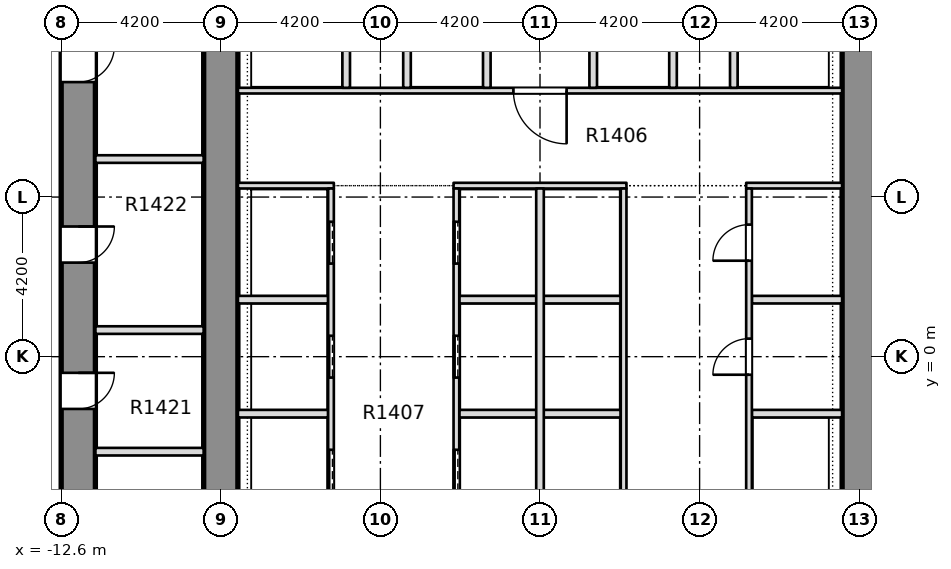
"""IFC4 building model, lengths in metres.
Left out: names, types, materials, properties, quantities, classifications, styles, units other than length and angle.
Written with IfcOpenShell. Run it as: python <this file> out.ifc"""

import sys

from ifc_helpers import new_model, si_unit, direction, frame, frame_2d, origin, place, context, subcontext, project, spatial, rectangle, extrude, element, fill, save


model = new_model("IFC4")
c1 = context("Model", 3, precision=1e-05, world=origin(), true_north=direction((0.0, 1.0)))
c2 = subcontext(c1, "Body", "Model", "MODEL_VIEW")
j1 = project(units=[si_unit("LENGTHUNIT", "METRE"), si_unit("PLANEANGLEUNIT", "RADIAN")], contexts=[c1])
p1 = place(None, origin())
s1 = spatial("IfcSite", under=j1, at=p1, CompositionType="ELEMENT")
p2 = place(p1, origin())
s2 = spatial("IfcBuilding", under=s1, at=p2, CompositionType="ELEMENT")
p3 = place(p2, frame((0.0, 0.0, 62.1)))
s3 = spatial("IfcBuildingStorey", under=s2, at=p3, CompositionType="ELEMENT", Elevation=62.1)
p4 = place(p3, frame((-12.15, -8.4, -0.32), z_axis=(0.0, 0.0, 1.0), x_axis=(0.0, 1.0, 0.0)))
e1 = element("IfcWall", 1, at=p4, inside=s3, PredefinedType="SHEAR", context=c2, shape_type="SweptSolid", body=[
    extrude(rectangle(XDim=30.15, YDim=0.9, at=frame_2d((15.075, 0.0))), origin(), (0.0, 0.0, 1.0), 3.45),
])
p5 = place(p4, frame((2.925, 0.0, 0.32)))
e2 = element("IfcOpeningElement", 2, at=p5, cuts=e1, PredefinedType="OPENING", context=c2, shape_type="SweptSolid", body=[
    extrude(rectangle(XDim=0.95, YDim=2.1, at=frame_2d((0.475, 1.05))), frame((0.0, 0.46, 0.0), z_axis=(0.0, -1.0, 0.0), x_axis=(1.0, 0.0, 0.0)), (0.0, 0.0, 1.0), 0.92),
])
p6 = place(p4, frame((7.025, 0.0, 0.32)))
e3 = element("IfcOpeningElement", 3, at=p6, cuts=e1, PredefinedType="OPENING", context=c2, shape_type="SweptSolid", body=[
    extrude(rectangle(XDim=0.95, YDim=2.1, at=frame_2d((0.475, 1.05))), frame((0.0, 0.46, 0.0), z_axis=(0.0, -1.0, 0.0), x_axis=(1.0, 0.0, 0.0)), (0.0, 0.0, 1.0), 0.92),
])
p7 = place(p4, frame((10.875, 0.0, 0.32)))
e4 = element("IfcOpeningElement", 4, at=p7, cuts=e1, PredefinedType="OPENING", context=c2, shape_type="SweptSolid", body=[
    extrude(rectangle(XDim=0.95, YDim=2.1, at=frame_2d((0.475, 1.05))), frame((0.0, 0.46, 0.0), z_axis=(0.0, -1.0, 0.0), x_axis=(1.0, 0.0, 0.0)), (0.0, 0.0, 1.0), 0.92),
])
p8 = place(p4, frame((15.625, 0.0, 0.32)))
e5 = element("IfcOpeningElement", 5, at=p8, cuts=e1, PredefinedType="OPENING", context=c2, shape_type="SweptSolid", body=[
    extrude(rectangle(XDim=0.95, YDim=2.1, at=frame_2d((0.475, 1.05))), frame((0.0, 0.46, 0.0), z_axis=(0.0, -1.0, 0.0), x_axis=(1.0, 0.0, 0.0)), (0.0, 0.0, 1.0), 0.92),
])
p9 = place(p4, frame((24.75, 0.0, 0.32)))
e6 = element("IfcOpeningElement", 6, at=p9, cuts=e1, PredefinedType="OPENING", context=c2, shape_type="SweptSolid", body=[
    extrude(rectangle(XDim=0.95, YDim=2.1, at=frame_2d((0.475, 1.05))), frame((0.0, 0.46, 0.0), z_axis=(0.0, -1.0, 0.0), x_axis=(1.0, 0.0, 0.0)), (0.0, 0.0, 1.0), 0.92),
])
p10 = place(p4, frame((19.3, 0.0, 0.32)))
e7 = element("IfcOpeningElement", 7, at=p10, cuts=e1, PredefinedType="OPENING", context=c2, shape_type="SweptSolid", body=[
    extrude(rectangle(XDim=1.2, YDim=2.1, at=frame_2d((0.6, 1.05))), frame((0.0, 0.46, 0.0), z_axis=(0.0, -1.0, 0.0), x_axis=(1.0, 0.0, 0.0)), (0.0, 0.0, 1.0), 0.92),
])
p11 = place(p3, frame((-8.4, -7.5, -0.32), z_axis=(0.0, 0.0, 1.0), x_axis=(0.0, 1.0, 0.0)))
e8 = element("IfcWall", 8, at=p11, inside=s3, PredefinedType="SHEAR", context=c2, shape_type="SweptSolid", body=[
    extrude(rectangle(XDim=28.35, YDim=0.9, at=frame_2d((14.175, 0.0))), origin(), (0.0, 0.0, 1.0), 3.45),
])
p12 = place(p11, frame((18.4, 0.0, 0.32)))
e9 = element("IfcOpeningElement", 9, at=p12, cuts=e8, PredefinedType="OPENING", context=c2, shape_type="SweptSolid", body=[
    extrude(rectangle(XDim=1.2, YDim=2.1, at=frame_2d((0.6, 1.05))), frame((0.0, 0.46, 0.0), z_axis=(0.0, -1.0, 0.0), x_axis=(1.0, 0.0, 0.0)), (0.0, 0.0, 1.0), 0.92),
])
p13 = place(p3, frame((8.4, -7.5, -0.32), z_axis=(0.0, 0.0, 1.0), x_axis=(0.0, 1.0, 0.0)))
e10 = element("IfcWall", 10, at=p13, inside=s3, PredefinedType="SHEAR", context=c2, shape_type="SweptSolid", body=[
    extrude(rectangle(XDim=28.35, YDim=0.9, at=frame_2d((14.175, 0.0))), origin(), (0.0, 0.0, 1.0), 3.45),
])
p14 = place(p13, frame((18.4, 0.0, 0.32)))
e11 = element("IfcOpeningElement", 11, at=p14, cuts=e10, PredefinedType="OPENING", context=c2, shape_type="SweptSolid", body=[
    extrude(rectangle(XDim=1.2, YDim=2.1, at=frame_2d((0.6, 1.05))), frame((0.0, 0.46, 0.0), z_axis=(0.0, -1.0, 0.0), x_axis=(1.0, 0.0, 0.0)), (0.0, 0.0, 1.0), 0.92),
])
p15 = place(p3, frame((-7.949, -1.5, 0.0), z_axis=(0.0, 0.0, 1.0), x_axis=(1.0, 0.0, 0.0)))
e12 = element("IfcWall", 12, at=p15, inside=s3, PredefinedType="PARTITIONING", context=c2, shape_type="SweptSolid", body=[
    extrude(rectangle(XDim=2.374, YDim=0.2, at=frame_2d((1.187, 0.0))), origin(), (0.0, 0.0, 1.0), 3.13),
])
p16 = place(p3, frame((-2.125, -1.5, 0.0), z_axis=(0.0, 0.0, 1.0), x_axis=(1.0, 0.0, 0.0)))
e13 = element("IfcWall", 13, at=p16, inside=s3, PredefinedType="PARTITIONING", context=c2, shape_type="SweptSolid", body=[
    extrude(rectangle(XDim=4.25, YDim=0.2, at=frame_2d((2.125, 0.0))), origin(), (0.0, 0.0, 1.0), 3.13),
])
for number, where, z_axis, x_axis in (
    (14, (5.575, -1.5, 0.0), (0.0, 0.0, 1.0), (1.0, 0.0, 0.0)),
    (15, (-7.949, 1.5, 0.0), (0.0, 0.0, 1.0), (1.0, 0.0, 0.0)),
):
    element("IfcWall", number, at=place(p3, frame(where, z_axis=z_axis, x_axis=x_axis)), inside=s3, PredefinedType="PARTITIONING", context=c2, shape_type="SweptSolid", body=[
        extrude(rectangle(XDim=2.374, YDim=0.2, at=frame_2d((1.187, 0.0))), origin(), (0.0, 0.0, 1.0), 3.13),
    ])
p17 = place(p3, frame((-2.125, 1.5, 0.0), z_axis=(0.0, 0.0, 1.0), x_axis=(1.0, 0.0, 0.0)))
e16 = element("IfcWall", 16, at=p17, inside=s3, PredefinedType="PARTITIONING", context=c2, shape_type="SweptSolid", body=[
    extrude(rectangle(XDim=4.25, YDim=0.2, at=frame_2d((2.125, 0.0))), origin(), (0.0, 0.0, 1.0), 3.13),
])
p18 = place(p3, frame((5.575, 1.5, 0.0), z_axis=(0.0, 0.0, 1.0), x_axis=(1.0, 0.0, 0.0)))
e17 = element("IfcWall", 17, at=p18, inside=s3, PredefinedType="PARTITIONING", context=c2, shape_type="SweptSolid", body=[
    extrude(rectangle(XDim=2.374, YDim=0.2, at=frame_2d((1.187, 0.0))), origin(), (0.0, 0.0, 1.0), 3.13),
])
p19 = place(p3, frame((-7.949, 4.5, 0.0), z_axis=(0.0, 0.0, 1.0), x_axis=(1.0, 0.0, 0.0)))
e18 = element("IfcWall", 18, at=p19, inside=s3, PredefinedType="PARTITIONING", context=c2, shape_type="SweptSolid", body=[
    extrude(rectangle(XDim=2.524, YDim=0.15, at=frame_2d((1.262, 0.0))), origin(), (0.0, 0.0, 1.0), 3.13),
])
p20 = place(p3, frame((-2.275, 4.5, 0.0), z_axis=(0.0, 0.0, 1.0), x_axis=(1.0, 0.0, 0.0)))
e19 = element("IfcWall", 19, at=p20, inside=s3, PredefinedType="PARTITIONING", context=c2, shape_type="SweptSolid", body=[
    extrude(rectangle(XDim=4.55, YDim=0.15, at=frame_2d((2.275, 0.0))), origin(), (0.0, 0.0, 1.0), 3.13),
])
p21 = place(p3, frame((5.425, 4.5, 0.0), z_axis=(0.0, 0.0, 1.0), x_axis=(1.0, 0.0, 0.0)))
e20 = element("IfcWall", 20, at=p21, inside=s3, PredefinedType="PARTITIONING", context=c2, shape_type="SweptSolid", body=[
    extrude(rectangle(XDim=2.524, YDim=0.15, at=frame_2d((1.262, 0.0))), origin(), (0.0, 0.0, 1.0), 3.13),
])
p22 = place(p3, frame((-7.949, 7.0, 0.0), z_axis=(0.0, 0.0, 1.0), x_axis=(1.0, 0.0, 0.0)))
e21 = element("IfcWall", 21, at=p22, inside=s3, PredefinedType="PARTITIONING", context=c2, shape_type="SweptSolid", body=[
    extrude(rectangle(XDim=15.898, YDim=0.15, at=frame_2d((7.949, 0.0))), origin(), (0.0, 0.0, 1.0), 3.13),
])
p23 = place(p22, frame((7.249, 0.0, 0.0)))
e22 = element("IfcOpeningElement", 22, at=p23, cuts=e21, PredefinedType="OPENING", context=c2, shape_type="SweptSolid", body=[
    extrude(rectangle(XDim=1.4, YDim=2.1, at=frame_2d((0.7, 1.05))), frame((0.0, 0.085, 0.0), z_axis=(0.0, -1.0, 0.0), x_axis=(1.0, 0.0, 0.0)), (0.0, 0.0, 1.0), 0.17),
])
p24 = place(p3, frame((-5.5, -7.499, 0.0), z_axis=(0.0, 0.0, 1.0), x_axis=(0.0, 1.0, 0.0)))
e23 = element("IfcWall", 23, at=p24, inside=s3, PredefinedType="PARTITIONING", context=c2, shape_type="SweptSolid", body=[
    extrude(rectangle(XDim=11.924, YDim=0.15, at=frame_2d((5.962, 0.0))), origin(), (0.0, 0.0, 1.0), 3.13),
])
p25 = place(p24, frame((0.949, 0.0, 0.0)))
e24 = element("IfcOpeningElement", 24, at=p25, cuts=e23, PredefinedType="OPENING", context=c2, shape_type="SweptSolid", body=[
    extrude(rectangle(XDim=1.1, YDim=2.1, at=frame_2d((0.55, 1.05))), frame((0.0, 0.085, 0.0), z_axis=(0.0, -1.0, 0.0), x_axis=(1.0, 0.0, 0.0)), (0.0, 0.0, 1.0), 0.17),
])
p26 = place(p24, frame((3.949, 0.0, 0.0)))
e25 = element("IfcOpeningElement", 25, at=p26, cuts=e23, PredefinedType="OPENING", context=c2, shape_type="SweptSolid", body=[
    extrude(rectangle(XDim=1.1, YDim=2.1, at=frame_2d((0.55, 1.05))), frame((0.0, 0.085, 0.0), z_axis=(0.0, -1.0, 0.0), x_axis=(1.0, 0.0, 0.0)), (0.0, 0.0, 1.0), 0.17),
])
p27 = place(p24, frame((6.949, 0.0, 0.0)))
e26 = element("IfcOpeningElement", 26, at=p27, cuts=e23, PredefinedType="OPENING", context=c2, shape_type="SweptSolid", body=[
    extrude(rectangle(XDim=1.1, YDim=2.1, at=frame_2d((0.55, 1.05))), frame((0.0, 0.085, 0.0), z_axis=(0.0, -1.0, 0.0), x_axis=(1.0, 0.0, 0.0)), (0.0, 0.0, 1.0), 0.17),
])
p28 = place(p24, frame((9.949, 0.0, 0.0)))
e27 = element("IfcOpeningElement", 27, at=p28, cuts=e23, PredefinedType="OPENING", context=c2, shape_type="SweptSolid", body=[
    extrude(rectangle(XDim=1.1, YDim=2.1, at=frame_2d((0.55, 1.05))), frame((0.0, 0.085, 0.0), z_axis=(0.0, -1.0, 0.0), x_axis=(1.0, 0.0, 0.0)), (0.0, 0.0, 1.0), 0.17),
])
p29 = place(p3, frame((-5.1, 7.075, 0.0), z_axis=(0.0, 0.0, 1.0), x_axis=(0.0, 1.0, 0.0)))
e28 = element("IfcWall", 28, at=p29, inside=s3, PredefinedType="PARTITIONING", context=c2, shape_type="SweptSolid", body=[
    extrude(rectangle(XDim=2.725, YDim=0.2, at=frame_2d((1.363, 0.0))), origin(), (0.0, 0.0, 1.0), 3.13),
])
p30 = place(p3, frame((-3.5, 7.075, 0.0), z_axis=(0.0, 0.0, 1.0), x_axis=(0.0, 1.0, 0.0)))
e29 = element("IfcWall", 29, at=p30, inside=s3, PredefinedType="PARTITIONING", context=c2, shape_type="SweptSolid", body=[
    extrude(rectangle(XDim=2.85, YDim=0.2, at=frame_2d((1.425, 0.0))), origin(), (0.0, 0.0, 1.0), 3.13),
])
p31 = place(p3, frame((-2.2, -7.499, 0.0), z_axis=(0.0, 0.0, 1.0), x_axis=(0.0, 1.0, 0.0)))
e30 = element("IfcWall", 30, at=p31, inside=s3, PredefinedType="PARTITIONING", context=c2, shape_type="SweptSolid", body=[
    extrude(rectangle(XDim=11.924, YDim=0.15, at=frame_2d((5.962, 0.0))), origin(), (0.0, 0.0, 1.0), 3.13),
])
p32 = place(p31, frame((0.949, 0.0, 0.0)))
e31 = element("IfcOpeningElement", 31, at=p32, cuts=e30, PredefinedType="OPENING", context=c2, shape_type="SweptSolid", body=[
    extrude(rectangle(XDim=1.1, YDim=2.1, at=frame_2d((0.55, 1.05))), frame((0.0, 0.085, 0.0), z_axis=(0.0, -1.0, 0.0), x_axis=(1.0, 0.0, 0.0)), (0.0, 0.0, 1.0), 0.17),
])
p33 = place(p31, frame((3.949, 0.0, 0.0)))
e32 = element("IfcOpeningElement", 32, at=p33, cuts=e30, PredefinedType="OPENING", context=c2, shape_type="SweptSolid", body=[
    extrude(rectangle(XDim=1.1, YDim=2.1, at=frame_2d((0.55, 1.05))), frame((0.0, 0.085, 0.0), z_axis=(0.0, -1.0, 0.0), x_axis=(1.0, 0.0, 0.0)), (0.0, 0.0, 1.0), 0.17),
])
p34 = place(p31, frame((6.949, 0.0, 0.0)))
e33 = element("IfcOpeningElement", 33, at=p34, cuts=e30, PredefinedType="OPENING", context=c2, shape_type="SweptSolid", body=[
    extrude(rectangle(XDim=1.1, YDim=2.1, at=frame_2d((0.55, 1.05))), frame((0.0, 0.085, 0.0), z_axis=(0.0, -1.0, 0.0), x_axis=(1.0, 0.0, 0.0)), (0.0, 0.0, 1.0), 0.17),
])
p35 = place(p31, frame((9.949, 0.0, 0.0)))
e34 = element("IfcOpeningElement", 34, at=p35, cuts=e30, PredefinedType="OPENING", context=c2, shape_type="SweptSolid", body=[
    extrude(rectangle(XDim=1.1, YDim=2.1, at=frame_2d((0.55, 1.05))), frame((0.0, 0.085, 0.0), z_axis=(0.0, -1.0, 0.0), x_axis=(1.0, 0.0, 0.0)), (0.0, 0.0, 1.0), 0.17),
])
p36 = place(p3, frame((-1.4, 7.075, 0.0), z_axis=(0.0, 0.0, 1.0), x_axis=(0.0, 1.0, 0.0)))
e35 = element("IfcWall", 35, at=p36, inside=s3, PredefinedType="PARTITIONING", context=c2, shape_type="SweptSolid", body=[
    extrude(rectangle(XDim=2.85, YDim=0.2, at=frame_2d((1.425, 0.0))), origin(), (0.0, 0.0, 1.0), 3.13),
])
p37 = place(p3, frame((0.0, -7.499, 0.0), z_axis=(0.0, 0.0, 1.0), x_axis=(0.0, 1.0, 0.0)))
e36 = element("IfcWall", 36, at=p37, inside=s3, PredefinedType="PARTITIONING", context=c2, shape_type="SweptSolid", body=[
    extrude(rectangle(XDim=11.924, YDim=0.2, at=frame_2d((5.962, 0.0))), origin(), (0.0, 0.0, 1.0), 3.13),
])
p38 = place(p3, frame((1.4, 7.075, 0.0), z_axis=(0.0, 0.0, 1.0), x_axis=(0.0, 1.0, 0.0)))
e37 = element("IfcWall", 37, at=p38, inside=s3, PredefinedType="PARTITIONING", context=c2, shape_type="SweptSolid", body=[
    extrude(rectangle(XDim=2.85, YDim=0.2, at=frame_2d((1.425, 0.0))), origin(), (0.0, 0.0, 1.0), 3.13),
])
p39 = place(p3, frame((2.2, -7.499, 0.0), z_axis=(0.0, 0.0, 1.0), x_axis=(0.0, 1.0, 0.0)))
e38 = element("IfcWall", 38, at=p39, inside=s3, PredefinedType="PARTITIONING", context=c2, shape_type="SweptSolid", body=[
    extrude(rectangle(XDim=11.924, YDim=0.15, at=frame_2d((5.962, 0.0))), origin(), (0.0, 0.0, 1.0), 3.13),
])
p40 = place(p3, frame((3.5, 7.075, 0.0), z_axis=(0.0, 0.0, 1.0), x_axis=(0.0, 1.0, 0.0)))
e39 = element("IfcWall", 39, at=p40, inside=s3, PredefinedType="PARTITIONING", context=c2, shape_type="SweptSolid", body=[
    extrude(rectangle(XDim=2.85, YDim=0.2, at=frame_2d((1.425, 0.0))), origin(), (0.0, 0.0, 1.0), 3.13),
])
p41 = place(p3, frame((5.1, 7.075, 0.0), z_axis=(0.0, 0.0, 1.0), x_axis=(0.0, 1.0, 0.0)))
e40 = element("IfcWall", 40, at=p41, inside=s3, PredefinedType="PARTITIONING", context=c2, shape_type="SweptSolid", body=[
    extrude(rectangle(XDim=2.725, YDim=0.2, at=frame_2d((1.363, 0.0))), origin(), (0.0, 0.0, 1.0), 3.13),
])
p42 = place(p3, frame((5.5, -7.499, 0.0), z_axis=(0.0, 0.0, 1.0), x_axis=(0.0, 1.0, 0.0)))
e41 = element("IfcWall", 41, at=p42, inside=s3, PredefinedType="PARTITIONING", context=c2, shape_type="SweptSolid", body=[
    extrude(rectangle(XDim=11.924, YDim=0.15, at=frame_2d((5.962, 0.0))), origin(), (0.0, 0.0, 1.0), 3.13),
])
p43 = place(p42, frame((7.024, 0.0, 0.0)))
e42 = element("IfcOpeningElement", 42, at=p43, cuts=e41, PredefinedType="OPENING", context=c2, shape_type="SweptSolid", body=[
    extrude(rectangle(XDim=0.95, YDim=2.1, at=frame_2d((0.475, 1.05))), frame((0.0, 0.085, 0.0), z_axis=(0.0, -1.0, 0.0), x_axis=(1.0, 0.0, 0.0)), (0.0, 0.0, 1.0), 0.17),
])
p44 = place(p42, frame((10.024, 0.0, 0.0)))
e43 = element("IfcOpeningElement", 43, at=p44, cuts=e41, PredefinedType="OPENING", context=c2, shape_type="SweptSolid", body=[
    extrude(rectangle(XDim=0.95, YDim=2.1, at=frame_2d((0.475, 1.05))), frame((0.0, 0.085, 0.0), z_axis=(0.0, -1.0, 0.0), x_axis=(1.0, 0.0, 0.0)), (0.0, 0.0, 1.0), 0.17),
])
for number, where, z_axis, x_axis in (
    (44, (-11.699, -2.5, 0.0), (0.0, 0.0, 1.0), (1.0, 0.0, 0.0)),
    (45, (-11.699, 0.7, 0.0), (0.0, 0.0, 1.0), (1.0, 0.0, 0.0)),
    (46, (-11.699, 5.2, 0.0), (0.0, 0.0, 1.0), (1.0, 0.0, 0.0)),
):
    element("IfcWall", number, at=place(p3, frame(where, z_axis=z_axis, x_axis=x_axis)), inside=s3, PredefinedType="PARTITIONING", context=c2, shape_type="SweptSolid", body=[
        extrude(rectangle(XDim=2.848, YDim=0.2, at=frame_2d((1.424, 0.0))), origin(), (0.0, 0.0, 1.0), 3.13),
    ])
p45 = place(p26, origin())
e47 = element("IfcDoor", 47, at=p45, inside=s3, OperationType="SLIDING_TO_RIGHT", PredefinedType="DOOR", context=c2, shape_type="SweptSolid", body=[
    extrude(rectangle(XDim=1.1, YDim=2.1, at=frame_2d((0.55, 1.05))), frame((0.0, 0.025, 0.0), z_axis=(0.0, -1.0, 0.0), x_axis=(1.0, 0.0, 0.0)), (0.0, 0.0, 1.0), 0.05),
])
fill(e25, e47)
p46 = place(p27, origin())
e48 = element("IfcDoor", 48, at=p46, inside=s3, OperationType="SLIDING_TO_RIGHT", PredefinedType="DOOR", context=c2, shape_type="SweptSolid", body=[
    extrude(rectangle(XDim=1.1, YDim=2.1, at=frame_2d((0.55, 1.05))), frame((0.0, 0.025, 0.0), z_axis=(0.0, -1.0, 0.0), x_axis=(1.0, 0.0, 0.0)), (0.0, 0.0, 1.0), 0.05),
])
fill(e26, e48)
p47 = place(p28, origin())
e49 = element("IfcDoor", 49, at=p47, inside=s3, OperationType="SLIDING_TO_RIGHT", PredefinedType="DOOR", context=c2, shape_type="SweptSolid", body=[
    extrude(rectangle(XDim=1.1, YDim=2.1, at=frame_2d((0.55, 1.05))), frame((0.0, 0.025, 0.0), z_axis=(0.0, -1.0, 0.0), x_axis=(1.0, 0.0, 0.0)), (0.0, 0.0, 1.0), 0.05),
])
fill(e27, e49)
p48 = place(p33, origin())
e50 = element("IfcDoor", 50, at=p48, inside=s3, OperationType="SLIDING_TO_RIGHT", PredefinedType="DOOR", context=c2, shape_type="SweptSolid", body=[
    extrude(rectangle(XDim=1.1, YDim=2.1, at=frame_2d((0.55, 1.05))), frame((0.0, 0.025, 0.0), z_axis=(0.0, -1.0, 0.0), x_axis=(1.0, 0.0, 0.0)), (0.0, 0.0, 1.0), 0.05),
])
fill(e32, e50)
p49 = place(p34, origin())
e51 = element("IfcDoor", 51, at=p49, inside=s3, OperationType="SLIDING_TO_RIGHT", PredefinedType="DOOR", context=c2, shape_type="SweptSolid", body=[
    extrude(rectangle(XDim=1.1, YDim=2.1, at=frame_2d((0.55, 1.05))), frame((0.0, 0.025, 0.0), z_axis=(0.0, -1.0, 0.0), x_axis=(1.0, 0.0, 0.0)), (0.0, 0.0, 1.0), 0.05),
])
fill(e33, e51)
p50 = place(p35, origin())
e52 = element("IfcDoor", 52, at=p50, inside=s3, OperationType="SLIDING_TO_RIGHT", PredefinedType="DOOR", context=c2, shape_type="SweptSolid", body=[
    extrude(rectangle(XDim=1.1, YDim=2.1, at=frame_2d((0.55, 1.05))), frame((0.0, 0.025, 0.0), z_axis=(0.0, -1.0, 0.0), x_axis=(1.0, 0.0, 0.0)), (0.0, 0.0, 1.0), 0.05),
])
fill(e34, e52)
p51 = place(p43, origin())
e53 = element("IfcDoor", 53, at=p51, inside=s3, OperationType="SINGLE_SWING_RIGHT", PredefinedType="DOOR", context=c2, shape_type="SweptSolid", body=[
    extrude(rectangle(XDim=0.95, YDim=2.1, at=frame_2d((0.475, 1.05))), frame((0.0, 0.025, 0.0), z_axis=(0.0, -1.0, 0.0), x_axis=(1.0, 0.0, 0.0)), (0.0, 0.0, 1.0), 0.05),
])
fill(e42, e53)
p52 = place(p44, origin())
e54 = element("IfcDoor", 54, at=p52, inside=s3, OperationType="SINGLE_SWING_RIGHT", PredefinedType="DOOR", context=c2, shape_type="SweptSolid", body=[
    extrude(rectangle(XDim=0.95, YDim=2.1, at=frame_2d((0.475, 1.05))), frame((0.0, 0.025, 0.0), z_axis=(0.0, -1.0, 0.0), x_axis=(1.0, 0.0, 0.0)), (0.0, 0.0, 1.0), 0.05),
])
fill(e43, e54)
p53 = place(p23, origin())
e55 = element("IfcDoor", 55, at=p53, inside=s3, OperationType="SINGLE_SWING_RIGHT", PredefinedType="DOOR", context=c2, shape_type="SweptSolid", body=[
    extrude(rectangle(XDim=1.4, YDim=2.1, at=frame_2d((0.7, 1.05))), frame((0.0, 0.025, 0.0), z_axis=(0.0, -1.0, 0.0), x_axis=(1.0, 0.0, 0.0)), (0.0, 0.0, 1.0), 0.05),
])
fill(e22, e55)
p54 = place(p6, origin())
e56 = element("IfcDoor", 56, at=p54, inside=s3, OperationType="SINGLE_SWING_LEFT", PredefinedType="DOOR", context=c2, shape_type="SweptSolid", body=[
    extrude(rectangle(XDim=0.95, YDim=2.1, at=frame_2d((0.475, 1.05))), frame((0.0, 0.025, 0.0), z_axis=(0.0, -1.0, 0.0), x_axis=(1.0, 0.0, 0.0)), (0.0, 0.0, 1.0), 0.05),
])
fill(e3, e56)
p55 = place(p7, origin())
e57 = element("IfcDoor", 57, at=p55, inside=s3, OperationType="SINGLE_SWING_LEFT", PredefinedType="DOOR", context=c2, shape_type="SweptSolid", body=[
    extrude(rectangle(XDim=0.95, YDim=2.1, at=frame_2d((0.475, 1.05))), frame((0.0, 0.025, 0.0), z_axis=(0.0, -1.0, 0.0), x_axis=(1.0, 0.0, 0.0)), (0.0, 0.0, 1.0), 0.05),
])
fill(e4, e57)
p56 = place(p8, origin())
e58 = element("IfcDoor", 58, at=p56, inside=s3, OperationType="SINGLE_SWING_LEFT", PredefinedType="DOOR", context=c2, shape_type="SweptSolid", body=[
    extrude(rectangle(XDim=0.95, YDim=2.1, at=frame_2d((0.475, 1.05))), frame((0.0, 0.025, 0.0), z_axis=(0.0, -1.0, 0.0), x_axis=(1.0, 0.0, 0.0)), (0.0, 0.0, 1.0), 0.05),
])
fill(e5, e58)
save(model, sys.argv[1])
